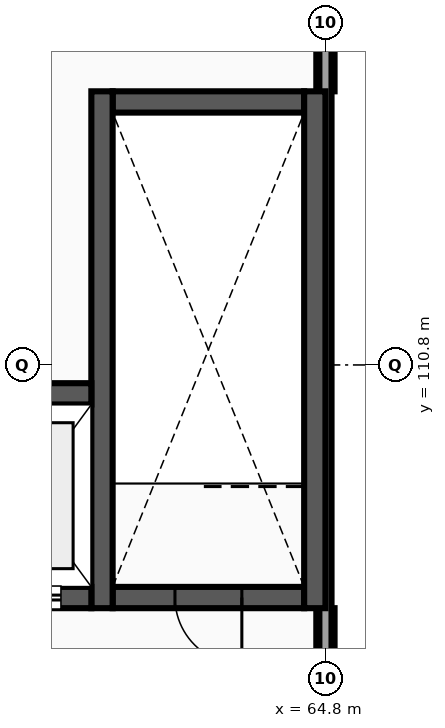
"""IFC4 building model, lengths in metres.
Left out: names, types, materials, properties, quantities, classifications, styles, units other than length and angle.
Written with IfcOpenShell. Run it as: python <this file> out.ifc"""

import sys

from ifc_helpers import new_model, si_unit, direction, frame, frame_2d, origin, place, context, subcontext, project, spatial, rectangle, extrude, element, fill, save


model = new_model("IFC4")
c1 = context("Model", 3, precision=1e-05, world=origin(), true_north=direction((0.0, 1.0)))
c2 = subcontext(c1, "Body", "Model", "MODEL_VIEW")
j1 = project(units=[si_unit("LENGTHUNIT", "METRE"), si_unit("PLANEANGLEUNIT", "RADIAN")], contexts=[c1])
p1 = place(None, origin())
s1 = spatial("IfcSite", under=j1, at=p1, CompositionType="ELEMENT")
p2 = place(p1, origin())
s2 = spatial("IfcBuilding", under=s1, at=p2, CompositionType="ELEMENT")
p3 = place(p2, frame((0.0, 0.0, 22.8)))
s3 = spatial("IfcBuildingStorey", under=s2, at=p3, CompositionType="ELEMENT", Elevation=22.8)
p4 = place(p3, frame((64.8, 103.6, 0.0), z_axis=(0.0, 0.0, 1.0), x_axis=(0.0, 1.0, 0.0)))
e1 = element("IfcWall", 1, at=p4, inside=s3, PredefinedType="STANDARD", context=c2, shape_type="SweptSolid", body=[
    extrude(rectangle(XDim=3.2, YDim=0.3, at=frame_2d((1.6, 0.0))), origin(), (0.0, 0.0, 1.0), 4.11),
])
p5 = place(p4, frame((1.0, 0.0, 0.95)))
e2 = element("IfcOpeningElement", 2, at=p5, cuts=e1, PredefinedType="OPENING", context=c2, shape_type="SweptSolid", body=[
    extrude(rectangle(XDim=1.2, YDim=1.296, at=frame_2d((0.6, 0.648))), frame((0.0, 0.16, 0.0), z_axis=(0.0, -1.0, 0.0), x_axis=(1.0, 0.0, 0.0)), (0.0, 0.0, 1.0), 0.32),
])
p6 = place(p3, frame((64.8, 115.3, 0.0), z_axis=(0.0, 0.0, 1.0), x_axis=(0.0, 1.0, 0.0)))
e3 = element("IfcWall", 3, at=p6, inside=s3, PredefinedType="STANDARD", context=c2, shape_type="SweptSolid", body=[
    extrude(rectangle(XDim=2.55, YDim=0.3, at=frame_2d((1.275, 0.0))), origin(), (0.0, 0.0, 1.0), 4.11),
])
p7 = place(p3, frame((64.8, 96.6, 4.4), z_axis=(0.0, 0.0, 1.0), x_axis=(0.0, 1.0, 0.0)))
e4 = element("IfcWall", 4, at=p7, inside=s3, PredefinedType="PARAPET", context=c2, shape_type="SweptSolid", body=[
    extrude(rectangle(XDim=21.2, YDim=0.2, at=frame_2d((10.6, 0.0))), origin(), (0.0, 0.0, 1.0), 0.55),
])
p8 = place(p3, frame((61.3, 106.975, 0.0), z_axis=(0.0, 0.0, 1.0), x_axis=(1.0, 0.0, 0.0)))
e5 = element("IfcWall", 5, at=p8, inside=s3, PredefinedType="SHEAR", context=c2, shape_type="SweptSolid", body=[
    extrude(rectangle(XDim=3.15, YDim=0.35, at=frame_2d((1.575, 0.0))), origin(), (0.0, 0.0, 1.0), 4.18),
])
p9 = place(p8, frame((1.025, 0.0, 0.0)))
e6 = element("IfcOpeningElement", 6, at=p9, cuts=e5, PredefinedType="OPENING", context=c2, shape_type="SweptSolid", body=[
    extrude(rectangle(XDim=1.1, YDim=2.15, at=frame_2d((0.55, 1.075))), frame((0.0, 0.185, 0.0), z_axis=(0.0, -1.0, 0.0), x_axis=(1.0, 0.0, 0.0)), (0.0, 0.0, 1.0), 0.37),
])
p10 = place(p3, frame((61.3, 115.125, 0.0), z_axis=(0.0, 0.0, 1.0), x_axis=(1.0, 0.0, 0.0)))
e7 = element("IfcWall", 7, at=p10, inside=s3, PredefinedType="SHEAR", context=c2, shape_type="SweptSolid", body=[
    extrude(rectangle(XDim=3.15, YDim=0.35, at=frame_2d((1.575, 0.0))), origin(), (0.0, 0.0, 1.0), 4.18),
])
for number, where, z_axis, x_axis in (
    (8, (61.125, 106.8, 0.0), (0.0, 0.0, 1.0), (0.0, 1.0, 0.0)),
    (9, (64.625, 106.8, 0.0), (0.0, 0.0, 1.0), (0.0, 1.0, 0.0)),
):
    element("IfcWall", number, at=place(p3, frame(where, z_axis=z_axis, x_axis=x_axis)), inside=s3, PredefinedType="SHEAR", context=c2, shape_type="SweptSolid", body=[
        extrude(rectangle(XDim=8.5, YDim=0.35, at=frame_2d((4.25, 0.0))), origin(), (0.0, 0.0, 1.0), 4.18),
    ])
p11 = place(p3, frame((58.75, 106.975, 0.0), z_axis=(0.0, 0.0, 1.0), x_axis=(1.0, 0.0, 0.0)))
e10 = element("IfcWall", 10, at=p11, inside=s3, PredefinedType="SHEAR", context=c2, shape_type="SweptSolid", body=[
    extrude(rectangle(XDim=2.2, YDim=0.35, at=frame_2d((1.1, 0.0))), origin(), (0.0, 0.0, 1.0), 4.18),
])
p12 = place(p11, frame((0.5, 0.0, 0.0)))
e11 = element("IfcOpeningElement", 11, at=p12, cuts=e10, PredefinedType="OPENING", context=c2, shape_type="SweptSolid", body=[
    extrude(rectangle(XDim=1.2, YDim=2.2, at=frame_2d((0.6, 1.1))), frame((0.0, 0.185, 0.0), z_axis=(0.0, -1.0, 0.0), x_axis=(1.0, 0.0, 0.0)), (0.0, 0.0, 1.0), 0.37),
])
p13 = place(p3, frame((58.75, 110.325, 0.0), z_axis=(0.0, 0.0, 1.0), x_axis=(1.0, 0.0, 0.0)))
e12 = element("IfcWall", 12, at=p13, inside=s3, PredefinedType="SHEAR", context=c2, shape_type="SweptSolid", body=[
    extrude(rectangle(XDim=2.2, YDim=0.35, at=frame_2d((1.1, 0.0))), origin(), (0.0, 0.0, 1.0), 4.18),
])
p14 = place(p9, origin())
e13 = element("IfcDoor", 13, at=p14, inside=s3, OperationType="SINGLE_SWING_RIGHT", PredefinedType="DOOR", context=c2, shape_type="SweptSolid", body=[
    extrude(rectangle(XDim=1.1, YDim=2.15, at=frame_2d((0.55, 1.075))), frame((0.0, 0.025, 0.0), z_axis=(0.0, -1.0, 0.0), x_axis=(1.0, 0.0, 0.0)), (0.0, 0.0, 1.0), 0.05),
])
fill(e6, e13)
p15 = place(p12, origin())
e14 = element("IfcDoor", 14, at=p15, inside=s3, OperationType="SLIDING_TO_RIGHT", PredefinedType="DOOR", context=c2, shape_type="SweptSolid", body=[
    extrude(rectangle(XDim=1.2, YDim=2.2, at=frame_2d((0.6, 1.1))), frame((0.0, 0.025, 0.0), z_axis=(0.0, -1.0, 0.0), x_axis=(1.0, 0.0, 0.0)), (0.0, 0.0, 1.0), 0.05),
])
fill(e11, e14)
save(model, sys.argv[1])
